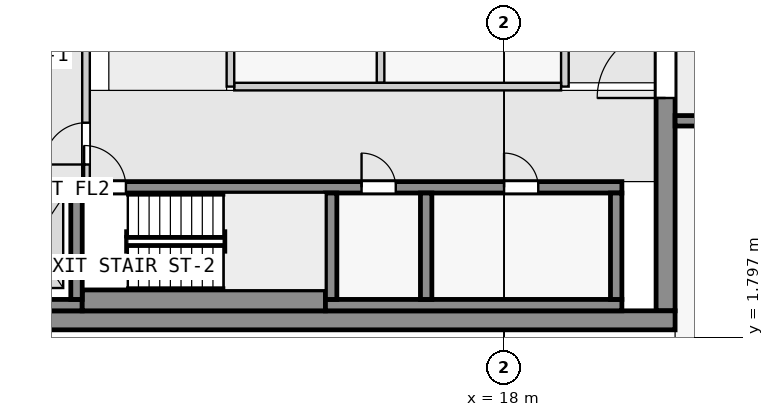
"""IFC4 building model, lengths in metres.
Left out: names, types, materials, properties, quantities, classifications, styles, units other than length and angle.
Written with IfcOpenShell. Run it as: python <this file> out.ifc"""

import sys

from ifc_helpers import new_model, si_unit, direction, frame, frame_2d, origin, place, context, subcontext, project, spatial, rectangle, extrude, element, fill, save


model = new_model("IFC4")
c1 = context("Model", 3, precision=1e-05, world=origin(), true_north=direction((0.0, 1.0)))
c2 = subcontext(c1, "Body", "Model", "MODEL_VIEW")
j1 = project(units=[si_unit("LENGTHUNIT", "METRE"), si_unit("PLANEANGLEUNIT", "RADIAN")], contexts=[c1])
p1 = place(None, origin())
s1 = spatial("IfcSite", under=j1, at=p1, CompositionType="ELEMENT")
p2 = place(p1, origin())
s2 = spatial("IfcBuilding", under=s1, at=p2, CompositionType="ELEMENT")
p3 = place(p2, frame((0.0, 0.0, 225.9)))
s3 = spatial("IfcBuildingStorey", under=s2, at=p3, CompositionType="ELEMENT", Elevation=225.9)
p4 = place(p3, frame((1.8, 2.25, 0.0), z_axis=(0.0, 0.0, 1.0), x_axis=(1.0, 0.0, 0.0)))
e1 = element("IfcWall", 1, at=p4, inside=s3, PredefinedType="SHEAR", context=c2, shape_type="SweptSolid", body=[
    extrude(rectangle(XDim=20.7, YDim=0.5, at=frame_2d((10.35, 0.0))), origin(), (0.0, 0.0, 1.0), 3.05),
])
p5 = place(p3, frame((22.25, 2.5, 0.0), z_axis=(0.0, 0.0, 1.0), x_axis=(0.0, 1.0, 0.0)))
e2 = element("IfcWall", 2, at=p5, inside=s3, PredefinedType="SHEAR", context=c2, shape_type="SweptSolid", body=[
    extrude(rectangle(XDim=15.0, YDim=0.5, at=frame_2d((7.5, 0.0))), origin(), (0.0, 0.0, 1.0), 3.05),
])
p6 = place(p5, frame((5.6, 0.0, 0.0)))
e3 = element("IfcOpeningElement", 3, at=p6, cuts=e2, PredefinedType="OPENING", context=c2, shape_type="SweptSolid", body=[
    extrude(rectangle(XDim=1.8, YDim=2.1, at=frame_2d((0.9, 1.05))), frame((0.0, 0.26, 0.0), z_axis=(0.0, -1.0, 0.0), x_axis=(1.0, 0.0, 0.0)), (0.0, 0.0, 1.0), 0.52),
])
p7 = place(p3, frame((2.3, 2.65, 0.0), z_axis=(0.0, 0.0, 1.0), x_axis=(1.0, 0.0, 0.0)))
e4 = element("IfcWall", 4, at=p7, inside=s3, PredefinedType="SHEAR", context=c2, shape_type="SweptSolid", body=[
    extrude(rectangle(XDim=4.6, YDim=0.3, at=frame_2d((2.3, 0.0))), origin(), (0.0, 0.0, 1.0), 3.05),
])
p8 = place(p3, frame((6.9, 2.775, 0.0), z_axis=(0.0, 0.0, 1.0), x_axis=(1.0, 0.0, 0.0)))
e5 = element("IfcWall", 5, at=p8, inside=s3, PredefinedType="SHEAR", context=c2, shape_type="SweptSolid", body=[
    extrude(rectangle(XDim=6.4, YDim=0.55, at=frame_2d((3.2, 0.0))), origin(), (0.0, 0.0, 1.0), 3.05),
])
p9 = place(p3, frame((13.3, 2.65, 0.0), z_axis=(0.0, 0.0, 1.0), x_axis=(1.0, 0.0, 0.0)))
e6 = element("IfcWall", 6, at=p9, inside=s3, PredefinedType="SHEAR", context=c2, shape_type="SweptSolid", body=[
    extrude(rectangle(XDim=7.8, YDim=0.3, at=frame_2d((3.9, 0.0))), origin(), (0.0, 0.0, 1.0), 3.05),
])
for number, where, z_axis, x_axis in (
    (7, (6.75, 2.8, 0.0), (0.0, 0.0, 1.0), (0.0, 1.0, 0.0)),
    (8, (13.45, 2.8, 0.0), (0.0, 0.0, 1.0), (0.0, 1.0, 0.0)),
    (9, (15.95, 2.8, 0.0), (0.0, 0.0, 1.0), (0.0, 1.0, 0.0)),
    (10, (20.95, 2.8, 0.0), (0.0, 0.0, 1.0), (0.0, 1.0, 0.0)),
):
    element("IfcWall", number, at=place(p3, frame(where, z_axis=z_axis, x_axis=x_axis)), inside=s3, PredefinedType="SHEAR", context=c2, shape_type="SweptSolid", body=[
        extrude(rectangle(XDim=2.8, YDim=0.3, at=frame_2d((1.4, 0.0))), origin(), (0.0, 0.0, 1.0), 3.05),
    ])
p10 = place(p3, frame((2.3, 5.75, 0.0), z_axis=(0.0, 0.0, 1.0), x_axis=(1.0, 0.0, 0.0)))
e11 = element("IfcWall", 11, at=p10, inside=s3, PredefinedType="SHEAR", context=c2, shape_type="SweptSolid", body=[
    extrude(rectangle(XDim=18.8, YDim=0.3, at=frame_2d((9.4, 0.0))), origin(), (0.0, 0.0, 1.0), 3.05),
])
p11 = place(p10, frame((4.65, 0.0, 0.0)))
e12 = element("IfcOpeningElement", 12, at=p11, cuts=e11, PredefinedType="OPENING", context=c2, shape_type="SweptSolid", body=[
    extrude(rectangle(XDim=1.1, YDim=2.1, at=frame_2d((0.55, 1.05))), frame((0.0, 0.16, 0.0), z_axis=(0.0, -1.0, 0.0), x_axis=(1.0, 0.0, 0.0)), (0.0, 0.0, 1.0), 0.32),
])
p12 = place(p10, frame((0.45, 0.0, 0.0)))
e13 = element("IfcOpeningElement", 13, at=p12, cuts=e11, PredefinedType="OPENING", context=c2, shape_type="SweptSolid", body=[
    extrude(rectangle(XDim=1.1, YDim=2.1, at=frame_2d((0.55, 1.05))), frame((0.0, 0.16, 0.0), z_axis=(0.0, -1.0, 0.0), x_axis=(1.0, 0.0, 0.0)), (0.0, 0.0, 1.0), 0.32),
])
p13 = place(p10, frame((2.75, 0.0, 0.0)))
e14 = element("IfcOpeningElement", 14, at=p13, cuts=e11, PredefinedType="OPENING", context=c2, shape_type="SweptSolid", body=[
    extrude(rectangle(XDim=1.1, YDim=2.1, at=frame_2d((0.55, 1.05))), frame((0.0, 0.16, 0.0), z_axis=(0.0, -1.0, 0.0), x_axis=(1.0, 0.0, 0.0)), (0.0, 0.0, 1.0), 0.32),
])
p14 = place(p10, frame((11.95, 0.0, 0.0)))
e15 = element("IfcOpeningElement", 15, at=p14, cuts=e11, PredefinedType="OPENING", context=c2, shape_type="SweptSolid", body=[
    extrude(rectangle(XDim=0.9, YDim=2.1, at=frame_2d((0.45, 1.05))), frame((0.0, 0.16, 0.0), z_axis=(0.0, -1.0, 0.0), x_axis=(1.0, 0.0, 0.0)), (0.0, 0.0, 1.0), 0.32),
])
p15 = place(p10, frame((15.7, 0.0, 0.0)))
e16 = element("IfcOpeningElement", 16, at=p15, cuts=e11, PredefinedType="OPENING", context=c2, shape_type="SweptSolid", body=[
    extrude(rectangle(XDim=0.9, YDim=2.1, at=frame_2d((0.45, 1.05))), frame((0.0, 0.16, 0.0), z_axis=(0.0, -1.0, 0.0), x_axis=(1.0, 0.0, 0.0)), (0.0, 0.0, 1.0), 0.32),
])
p16 = place(p3, frame((22.5, 7.5, 0.0), z_axis=(0.0, 0.0, 1.0), x_axis=(1.0, 0.0, 0.0)))
e17 = element("IfcWall", 17, at=p16, inside=s3, PredefinedType="SHEAR", context=c2, shape_type="SweptSolid", body=[
    extrude(rectangle(XDim=22.5, YDim=0.275, at=frame_2d((11.25, 0.0))), origin(), (0.0, 0.0, 1.0), 3.05),
])
p17 = place(p16, frame((1.75, 0.0, 0.0)))
e18 = element("IfcOpeningElement", 18, at=p17, cuts=e17, PredefinedType="OPENING", context=c2, shape_type="SweptSolid", body=[
    extrude(rectangle(XDim=1.0, YDim=2.1, at=frame_2d((0.5, 1.05))), frame((0.0, 0.147, 0.0), z_axis=(0.0, -1.0, 0.0), x_axis=(1.0, 0.0, 0.0)), (0.0, 0.0, 1.0), 0.295),
])
p18 = place(p16, frame((6.25, 0.0, 0.0)))
e19 = element("IfcOpeningElement", 19, at=p18, cuts=e17, PredefinedType="OPENING", context=c2, shape_type="SweptSolid", body=[
    extrude(rectangle(XDim=1.0, YDim=2.1, at=frame_2d((0.5, 1.05))), frame((0.0, 0.147, 0.0), z_axis=(0.0, -1.0, 0.0), x_axis=(1.0, 0.0, 0.0)), (0.0, 0.0, 1.0), 0.295),
])
p19 = place(p16, frame((10.75, 0.0, 0.0)))
e20 = element("IfcOpeningElement", 20, at=p19, cuts=e17, PredefinedType="OPENING", context=c2, shape_type="SweptSolid", body=[
    extrude(rectangle(XDim=1.0, YDim=2.1, at=frame_2d((0.5, 1.05))), frame((0.0, 0.147, 0.0), z_axis=(0.0, -1.0, 0.0), x_axis=(1.0, 0.0, 0.0)), (0.0, 0.0, 1.0), 0.295),
])
p20 = place(p16, frame((16.85, 0.0, 0.0)))
e21 = element("IfcOpeningElement", 21, at=p20, cuts=e17, PredefinedType="OPENING", context=c2, shape_type="SweptSolid", body=[
    extrude(rectangle(XDim=1.0, YDim=2.1, at=frame_2d((0.5, 1.05))), frame((0.0, 0.147, 0.0), z_axis=(0.0, -1.0, 0.0), x_axis=(1.0, 0.0, 0.0)), (0.0, 0.0, 1.0), 0.295),
])
p21 = place(p3, frame((7.0, 5.9, 0.0), z_axis=(0.0, 0.0, 1.0), x_axis=(0.0, 1.0, 0.0)))
e22 = element("IfcWall", 22, at=p21, inside=s3, PredefinedType="PARTITIONING", context=c2, shape_type="SweptSolid", body=[
    extrude(rectangle(XDim=4.0, YDim=0.2, at=frame_2d((2.0, 0.0))), origin(), (0.0, 0.0, 1.0), 3.05),
])
p22 = place(p21, frame((0.45, 0.0, 0.0)))
e23 = element("IfcOpeningElement", 23, at=p22, cuts=e22, PredefinedType="OPENING", context=c2, shape_type="SweptSolid", body=[
    extrude(rectangle(XDim=1.1, YDim=2.1, at=frame_2d((0.55, 1.05))), frame((0.0, 0.11, 0.0), z_axis=(0.0, -1.0, 0.0), x_axis=(1.0, 0.0, 0.0)), (0.0, 0.0, 1.0), 0.22),
])
p23 = place(p3, frame((10.8, 8.4, 0.0), z_axis=(0.0, 0.0, 1.0), x_axis=(0.0, 1.0, 0.0)))
e24 = element("IfcWall", 24, at=p23, inside=s3, PredefinedType="PARTITIONING", context=c2, shape_type="SweptSolid", body=[
    extrude(rectangle(XDim=3.8, YDim=0.2, at=frame_2d((1.9, 0.0))), origin(), (0.0, 0.0, 1.0), 3.05),
])
p24 = place(p3, frame((10.9, 8.4, 0.0), z_axis=(0.0, 0.0, 1.0), x_axis=(1.0, 0.0, 0.0)))
e25 = element("IfcWall", 25, at=p24, inside=s3, PredefinedType="PARTITIONING", context=c2, shape_type="SweptSolid", body=[
    extrude(rectangle(XDim=8.6, YDim=0.2, at=frame_2d((4.3, 0.0))), origin(), (0.0, 0.0, 1.0), 3.05),
])
p25 = place(p3, frame((19.6, 8.4, 0.0), z_axis=(0.0, 0.0, 1.0), x_axis=(0.0, 1.0, 0.0)))
e26 = element("IfcWall", 26, at=p25, inside=s3, PredefinedType="PARTITIONING", context=c2, shape_type="SweptSolid", body=[
    extrude(rectangle(XDim=3.8, YDim=0.2, at=frame_2d((1.9, 0.0))), origin(), (0.0, 0.0, 1.0), 3.05),
])
p26 = place(p3, frame((14.75, 8.5, 0.0), z_axis=(0.0, 0.0, 1.0), x_axis=(0.0, 1.0, 0.0)))
e27 = element("IfcWall", 27, at=p26, inside=s3, PredefinedType="PARTITIONING", context=c2, shape_type="SweptSolid", body=[
    extrude(rectangle(XDim=3.6, YDim=0.2, at=frame_2d((1.8, 0.0))), origin(), (0.0, 0.0, 1.0), 3.05),
])
p27 = place(p22, origin())
e28 = element("IfcDoor", 28, at=p27, inside=s3, OperationType="SINGLE_SWING_LEFT", PredefinedType="DOOR", context=c2, shape_type="SweptSolid", body=[
    extrude(rectangle(XDim=1.1, YDim=2.1, at=frame_2d((0.55, 1.05))), frame((0.0, 0.025, 0.0), z_axis=(0.0, -1.0, 0.0), x_axis=(1.0, 0.0, 0.0)), (0.0, 0.0, 1.0), 0.05),
])
fill(e23, e28)
p28 = place(p11, origin())
e29 = element("IfcDoor", 29, at=p28, inside=s3, OperationType="SINGLE_SWING_LEFT", PredefinedType="DOOR", context=c2, shape_type="SweptSolid", body=[
    extrude(rectangle(XDim=1.1, YDim=2.1, at=frame_2d((0.55, 1.05))), frame((0.0, 0.025, 0.0), z_axis=(0.0, -1.0, 0.0), x_axis=(1.0, 0.0, 0.0)), (0.0, 0.0, 1.0), 0.05),
])
fill(e12, e29)
p29 = place(p13, origin())
e30 = element("IfcDoor", 30, at=p29, inside=s3, OperationType="DOUBLE_DOOR_SLIDING", PredefinedType="DOOR", context=c2, shape_type="SweptSolid", body=[
    extrude(rectangle(XDim=1.1, YDim=2.1, at=frame_2d((0.55, 1.05))), frame((0.0, 0.025, 0.0), z_axis=(0.0, -1.0, 0.0), x_axis=(1.0, 0.0, 0.0)), (0.0, 0.0, 1.0), 0.05),
])
fill(e14, e30)
p30 = place(p6, origin())
e31 = element("IfcDoor", 31, at=p30, inside=s3, OperationType="DOUBLE_DOOR_SINGLE_SWING", PredefinedType="DOOR", context=c2, shape_type="SweptSolid", body=[
    extrude(rectangle(XDim=1.8, YDim=2.1, at=frame_2d((0.9, 1.05))), frame((0.0, 0.025, 0.0), z_axis=(0.0, -1.0, 0.0), x_axis=(1.0, 0.0, 0.0)), (0.0, 0.0, 1.0), 0.05),
])
fill(e3, e31)
p31 = place(p14, origin())
e32 = element("IfcDoor", 32, at=p31, inside=s3, OperationType="SINGLE_SWING_LEFT", PredefinedType="DOOR", context=c2, shape_type="SweptSolid", body=[
    extrude(rectangle(XDim=0.9, YDim=2.1, at=frame_2d((0.45, 1.05))), frame((0.0, 0.025, 0.0), z_axis=(0.0, -1.0, 0.0), x_axis=(1.0, 0.0, 0.0)), (0.0, 0.0, 1.0), 0.05),
])
fill(e15, e32)
p32 = place(p15, origin())
e33 = element("IfcDoor", 33, at=p32, inside=s3, OperationType="SINGLE_SWING_LEFT", PredefinedType="DOOR", context=c2, shape_type="SweptSolid", body=[
    extrude(rectangle(XDim=0.9, YDim=2.1, at=frame_2d((0.45, 1.05))), frame((0.0, 0.025, 0.0), z_axis=(0.0, -1.0, 0.0), x_axis=(1.0, 0.0, 0.0)), (0.0, 0.0, 1.0), 0.05),
])
fill(e16, e33)
save(model, sys.argv[1])
